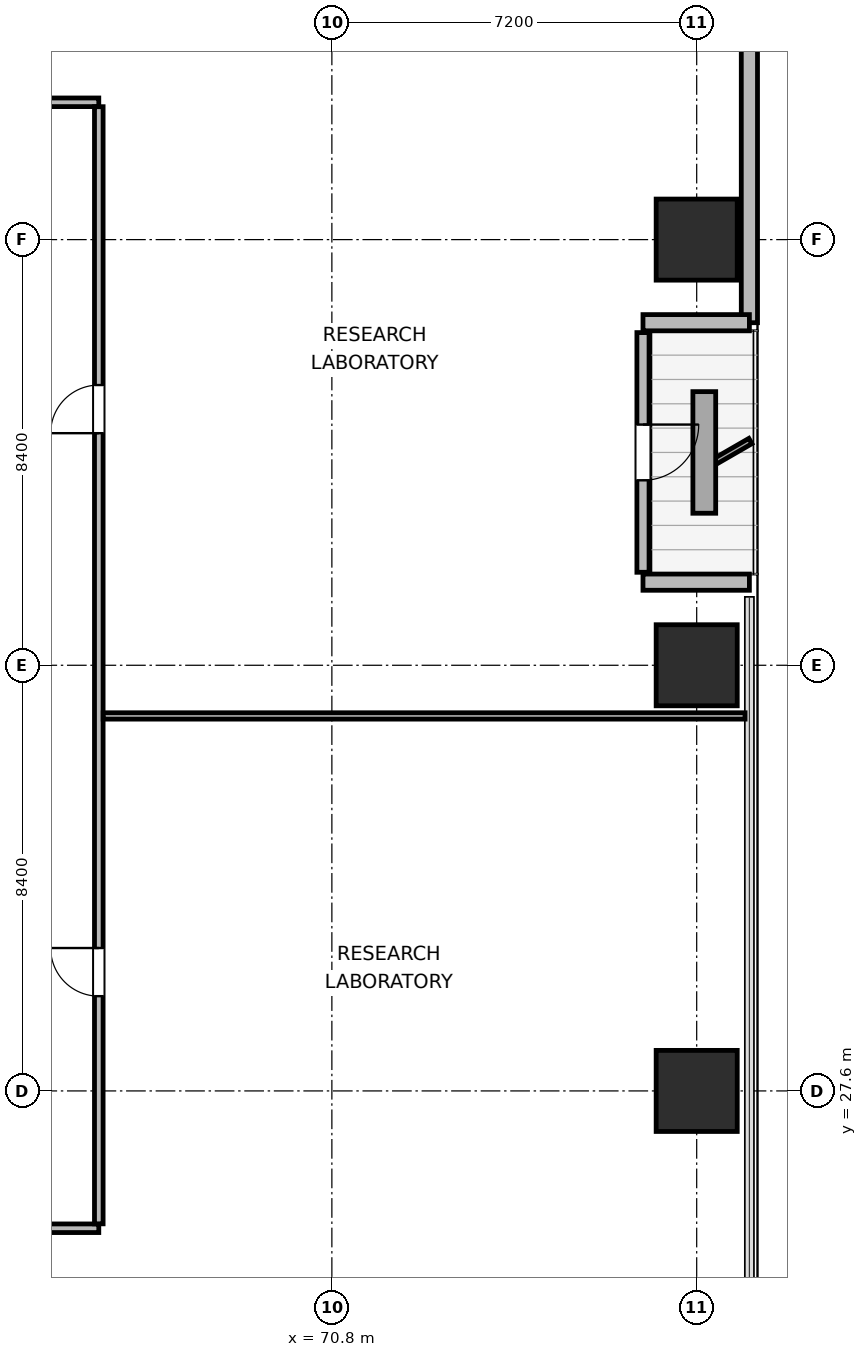
"""IFC4 building model, lengths in metres.
Left out: names, types, materials, properties, quantities, classifications, styles, units other than length and angle.
Written with IfcOpenShell. Run it as: python <this file> out.ifc"""

import sys

from ifc_helpers import new_model, si_unit, direction, frame, frame_2d, origin, origin_2d, place, context, subcontext, project, spatial, rectangle, extrude, element, fill, save


model = new_model("IFC4")
c1 = context("Model", 3, precision=1e-05, world=origin(), true_north=direction((0.0, 1.0)))
c2 = subcontext(c1, "Body", "Model", "MODEL_VIEW")
j1 = project(units=[si_unit("LENGTHUNIT", "METRE"), si_unit("PLANEANGLEUNIT", "RADIAN")], contexts=[c1])
p1 = place(None, origin())
s1 = spatial("IfcSite", under=j1, at=p1, CompositionType="ELEMENT")
p2 = place(p1, origin())
s2 = spatial("IfcBuilding", under=s1, at=p2, CompositionType="ELEMENT")
p3 = place(p2, frame((0.0, 0.0, 48.9)))
s3 = spatial("IfcBuildingStorey", under=s2, at=p3, CompositionType="ELEMENT", Elevation=48.9)
for number, where, z_axis, x_axis in (
    (1, (78.0, 27.6, 0.0), (0.0, 0.0, 1.0), (1.0, 0.0, 0.0)),
    (2, (78.0, 36.0, 0.0), (0.0, 0.0, 1.0), (1.0, 0.0, 0.0)),
    (3, (78.0, 44.4, 0.0), (0.0, 0.0, 1.0), (1.0, 0.0, 0.0)),
):
    element("IfcColumn", number, at=place(p3, frame(where, z_axis=z_axis, x_axis=x_axis)), inside=s3, PredefinedType="COLUMN", context=c2, shape_type="SweptSolid", body=[
        extrude(rectangle(XDim=1.6, YDim=1.6, at=origin_2d()), origin(), (0.0, 0.0, 1.0), 3.9),
    ])
p4 = place(p3, frame((79.04, 56.979, 0.0), z_axis=(0.0, 0.0, 1.0), x_axis=(0.0, -1.0, 0.0)))
e4 = element("IfcWall", 4, at=p4, inside=s3, PredefinedType="SOLIDWALL", context=c2, shape_type="SweptSolid", body=[
    extrude(rectangle(XDim=14.219, YDim=0.32, at=frame_2d((7.109, 0.0))), origin(), (0.0, 0.0, 1.0), 3.64),
])
p5 = place(p3, frame((79.04, 42.76, 0.0), z_axis=(0.0, 0.0, 1.0), x_axis=(-1.0, 0.0, 0.0)))
e5 = element("IfcWall", 5, at=p5, inside=s3, PredefinedType="SOLIDWALL", context=c2, shape_type="SweptSolid", body=[
    extrude(rectangle(XDim=2.1, YDim=0.32, at=frame_2d((1.05, 0.0))), origin(), (0.0, 0.0, 1.0), 2.875),
])
p6 = place(p3, frame((76.94, 42.565, 0.0), z_axis=(0.0, 0.0, 1.0), x_axis=(0.0, -1.0, 0.0)))
e6 = element("IfcWall", 6, at=p6, inside=s3, PredefinedType="SOLIDWALL", context=c2, shape_type="SweptSolid", body=[
    extrude(rectangle(XDim=4.73, YDim=0.24, at=frame_2d((2.365, 0.0))), origin(), (0.0, 0.0, 1.0), 3.162),
])
p7 = place(p6, frame((1.815, 0.0, 0.0)))
e7 = element("IfcOpeningElement", 7, at=p7, cuts=e6, PredefinedType="OPENING", context=c2, shape_type="SweptSolid", body=[
    extrude(rectangle(XDim=1.1, YDim=2.04, at=frame_2d((0.55, 1.02))), frame((0.0, 0.13, 0.0), z_axis=(0.0, -1.0, 0.0), x_axis=(1.0, 0.0, 0.0)), (0.0, 0.0, 1.0), 0.26),
])
p8 = place(p3, frame((76.94, 37.64, 0.0), z_axis=(0.0, 0.0, 1.0), x_axis=(1.0, 0.0, 0.0)))
e8 = element("IfcWall", 8, at=p8, inside=s3, PredefinedType="SOLIDWALL", context=c2, shape_type="SweptSolid", body=[
    extrude(rectangle(XDim=2.1, YDim=0.32, at=frame_2d((1.05, 0.0))), origin(), (0.0, 0.0, 1.0), 2.875),
])
p9 = place(p3, frame((29.8, 24.89, 0.0), z_axis=(0.0, 0.0, 1.0), x_axis=(1.0, 0.0, 0.0)))
e9 = element("IfcWall", 9, at=p9, inside=s3, PredefinedType="PARTITIONING", context=c2, shape_type="SweptSolid", body=[
    extrude(rectangle(XDim=36.4, YDim=0.17, at=frame_2d((18.2, 0.0))), origin(), (0.0, 0.0, 1.0), 3.64),
])
p10 = place(p9, frame((2.555, 0.0, 0.0)))
e10 = element("IfcOpeningElement", 10, at=p10, cuts=e9, PredefinedType="OPENING", context=c2, shape_type="SweptSolid", body=[
    extrude(rectangle(XDim=0.95, YDim=2.04, at=frame_2d((0.475, 1.02))), frame((0.0, 0.095, 0.0), z_axis=(0.0, -1.0, 0.0), x_axis=(1.0, 0.0, 0.0)), (0.0, 0.0, 1.0), 0.19),
])
p11 = place(p9, frame((8.01, 0.0, 0.0)))
e11 = element("IfcOpeningElement", 11, at=p11, cuts=e9, PredefinedType="OPENING", context=c2, shape_type="SweptSolid", body=[
    extrude(rectangle(XDim=0.95, YDim=2.04, at=frame_2d((0.475, 1.02))), frame((0.0, 0.095, 0.0), z_axis=(0.0, -1.0, 0.0), x_axis=(1.0, 0.0, 0.0)), (0.0, 0.0, 1.0), 0.19),
])
p12 = place(p9, frame((13.18, 0.0, 0.0)))
e12 = element("IfcOpeningElement", 12, at=p12, cuts=e9, PredefinedType="OPENING", context=c2, shape_type="SweptSolid", body=[
    extrude(rectangle(XDim=0.95, YDim=2.04, at=frame_2d((0.475, 1.02))), frame((0.0, 0.095, 0.0), z_axis=(0.0, -1.0, 0.0), x_axis=(1.0, 0.0, 0.0)), (0.0, 0.0, 1.0), 0.19),
])
p13 = place(p9, frame((18.04, 0.0, 0.0)))
e13 = element("IfcOpeningElement", 13, at=p13, cuts=e9, PredefinedType="OPENING", context=c2, shape_type="SweptSolid", body=[
    extrude(rectangle(XDim=0.95, YDim=2.04, at=frame_2d((0.475, 1.02))), frame((0.0, 0.095, 0.0), z_axis=(0.0, -1.0, 0.0), x_axis=(1.0, 0.0, 0.0)), (0.0, 0.0, 1.0), 0.19),
])
p14 = place(p9, frame((22.585, 0.0, 0.0)))
e14 = element("IfcOpeningElement", 14, at=p14, cuts=e9, PredefinedType="OPENING", context=c2, shape_type="SweptSolid", body=[
    extrude(rectangle(XDim=0.95, YDim=2.04, at=frame_2d((0.475, 1.02))), frame((0.0, 0.095, 0.0), z_axis=(0.0, -1.0, 0.0), x_axis=(1.0, 0.0, 0.0)), (0.0, 0.0, 1.0), 0.19),
])
p15 = place(p9, frame((27.44, 0.0, 0.0)))
e15 = element("IfcOpeningElement", 15, at=p15, cuts=e9, PredefinedType="OPENING", context=c2, shape_type="SweptSolid", body=[
    extrude(rectangle(XDim=0.95, YDim=2.04, at=frame_2d((0.475, 1.02))), frame((0.0, 0.095, 0.0), z_axis=(0.0, -1.0, 0.0), x_axis=(1.0, 0.0, 0.0)), (0.0, 0.0, 1.0), 0.19),
])
p16 = place(p9, frame((32.895, 0.0, 0.0)))
e16 = element("IfcOpeningElement", 16, at=p16, cuts=e9, PredefinedType="OPENING", context=c2, shape_type="SweptSolid", body=[
    extrude(rectangle(XDim=0.95, YDim=2.04, at=frame_2d((0.475, 1.02))), frame((0.0, 0.095, 0.0), z_axis=(0.0, -1.0, 0.0), x_axis=(1.0, 0.0, 0.0)), (0.0, 0.0, 1.0), 0.19),
])
p17 = place(p3, frame((29.8, 47.11, 0.0), z_axis=(0.0, 0.0, 1.0), x_axis=(1.0, 0.0, 0.0)))
e17 = element("IfcWall", 17, at=p17, inside=s3, PredefinedType="PARTITIONING", context=c2, shape_type="SweptSolid", body=[
    extrude(rectangle(XDim=36.4, YDim=0.17, at=frame_2d((18.2, 0.0))), origin(), (0.0, 0.0, 1.0), 3.64),
])
p18 = place(p17, frame((4.205, 0.0, 0.0)))
e18 = element("IfcOpeningElement", 18, at=p18, cuts=e17, PredefinedType="OPENING", context=c2, shape_type="SweptSolid", body=[
    extrude(rectangle(XDim=0.95, YDim=2.04, at=frame_2d((0.475, 1.02))), frame((0.0, 0.095, 0.0), z_axis=(0.0, -1.0, 0.0), x_axis=(1.0, 0.0, 0.0)), (0.0, 0.0, 1.0), 0.19),
])
p19 = place(p17, frame((10.385, 0.0, 0.0)))
e19 = element("IfcOpeningElement", 19, at=p19, cuts=e17, PredefinedType="OPENING", context=c2, shape_type="SweptSolid", body=[
    extrude(rectangle(XDim=0.95, YDim=2.04, at=frame_2d((0.475, 1.02))), frame((0.0, 0.095, 0.0), z_axis=(0.0, -1.0, 0.0), x_axis=(1.0, 0.0, 0.0)), (0.0, 0.0, 1.0), 0.19),
])
p20 = place(p17, frame((17.005, 0.0, 0.0)))
e20 = element("IfcOpeningElement", 20, at=p20, cuts=e17, PredefinedType="OPENING", context=c2, shape_type="SweptSolid", body=[
    extrude(rectangle(XDim=0.95, YDim=2.04, at=frame_2d((0.475, 1.02))), frame((0.0, 0.095, 0.0), z_axis=(0.0, -1.0, 0.0), x_axis=(1.0, 0.0, 0.0)), (0.0, 0.0, 1.0), 0.19),
])
p21 = place(p17, frame((24.755, 0.0, 0.0)))
e21 = element("IfcOpeningElement", 21, at=p21, cuts=e17, PredefinedType="OPENING", context=c2, shape_type="SweptSolid", body=[
    extrude(rectangle(XDim=0.95, YDim=2.04, at=frame_2d((0.475, 1.02))), frame((0.0, 0.095, 0.0), z_axis=(0.0, -1.0, 0.0), x_axis=(1.0, 0.0, 0.0)), (0.0, 0.0, 1.0), 0.19),
])
p22 = place(p17, frame((31.655, 0.0, 0.0)))
e22 = element("IfcOpeningElement", 22, at=p22, cuts=e17, PredefinedType="OPENING", context=c2, shape_type="SweptSolid", body=[
    extrude(rectangle(XDim=0.95, YDim=2.04, at=frame_2d((0.475, 1.02))), frame((0.0, 0.095, 0.0), z_axis=(0.0, -1.0, 0.0), x_axis=(1.0, 0.0, 0.0)), (0.0, 0.0, 1.0), 0.19),
])
p23 = place(p3, frame((66.2, 24.977, 0.0), z_axis=(0.0, 0.0, 1.0), x_axis=(0.0, 1.0, 0.0)))
e23 = element("IfcWall", 23, at=p23, inside=s3, PredefinedType="PARTITIONING", context=c2, shape_type="SweptSolid", body=[
    extrude(rectangle(XDim=22.046, YDim=0.17, at=frame_2d((11.023, 0.0))), origin(), (0.0, 0.0, 1.0), 3.64),
])
p24 = place(p23, frame((4.493, 0.0, 0.0)))
e24 = element("IfcOpeningElement", 24, at=p24, cuts=e23, PredefinedType="OPENING", context=c2, shape_type="SweptSolid", body=[
    extrude(rectangle(XDim=0.95, YDim=2.04, at=frame_2d((0.475, 1.02))), frame((0.0, 0.095, 0.0), z_axis=(0.0, -1.0, 0.0), x_axis=(1.0, 0.0, 0.0)), (0.0, 0.0, 1.0), 0.19),
])
p25 = place(p23, frame((15.603, 0.0, 0.0)))
e25 = element("IfcOpeningElement", 25, at=p25, cuts=e23, PredefinedType="OPENING", context=c2, shape_type="SweptSolid", body=[
    extrude(rectangle(XDim=0.95, YDim=2.04, at=frame_2d((0.475, 1.02))), frame((0.0, 0.095, 0.0), z_axis=(0.0, -1.0, 0.0), x_axis=(1.0, 0.0, 0.0)), (0.0, 0.0, 1.0), 0.19),
])
p26 = place(p3, frame((66.287, 35.0, 0.0), z_axis=(0.0, 0.0, 1.0), x_axis=(1.0, 0.0, 0.0)))
e26 = element("IfcWall", 26, at=p26, inside=s3, PredefinedType="PARTITIONING", context=c2, shape_type="SweptSolid", body=[
    extrude(rectangle(XDim=12.668, YDim=0.125, at=frame_2d((6.334, 0.0))), origin(), (0.0, 0.0, 1.0), 3.64),
])
p27 = place(p7, origin())
e27 = element("IfcDoor", 27, at=p27, inside=s3, OperationType="SINGLE_SWING_LEFT", PredefinedType="DOOR", context=c2, shape_type="SweptSolid", body=[
    extrude(rectangle(XDim=1.1, YDim=2.04, at=frame_2d((0.55, 1.02))), frame((0.0, 0.025, 0.0), z_axis=(0.0, -1.0, 0.0), x_axis=(1.0, 0.0, 0.0)), (0.0, 0.0, 1.0), 0.05),
])
fill(e7, e27)
p28 = place(p24, origin())
e28 = element("IfcDoor", 28, at=p28, inside=s3, OperationType="SINGLE_SWING_RIGHT", PredefinedType="DOOR", context=c2, shape_type="SweptSolid", body=[
    extrude(rectangle(XDim=0.95, YDim=2.04, at=frame_2d((0.475, 1.02))), frame((0.0, 0.025, 0.0), z_axis=(0.0, -1.0, 0.0), x_axis=(1.0, 0.0, 0.0)), (0.0, 0.0, 1.0), 0.05),
])
fill(e24, e28)
p29 = place(p25, origin())
e29 = element("IfcDoor", 29, at=p29, inside=s3, OperationType="SINGLE_SWING_LEFT", PredefinedType="DOOR", context=c2, shape_type="SweptSolid", body=[
    extrude(rectangle(XDim=0.95, YDim=2.04, at=frame_2d((0.475, 1.02))), frame((0.0, 0.025, 0.0), z_axis=(0.0, -1.0, 0.0), x_axis=(1.0, 0.0, 0.0)), (0.0, 0.0, 1.0), 0.05),
])
fill(e25, e29)
save(model, sys.argv[1])
